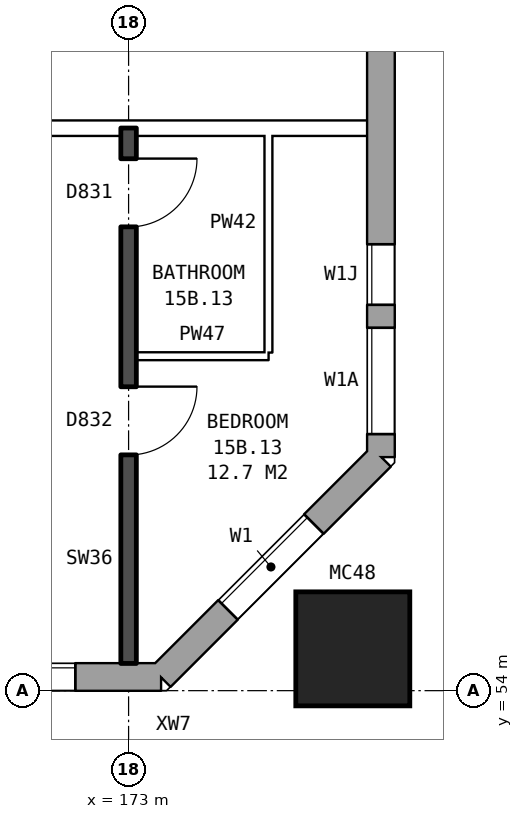
"""IFC4 building model, lengths in metres.
Left out: names, types, materials, properties, quantities, classifications, styles, units other than length and angle.
Written with IfcOpenShell. Run it as: python <this file> out.ifc"""

import sys

from ifc_helpers import new_model, si_unit, direction, frame, frame_2d, origin, origin_2d, place, context, subcontext, project, spatial, rectangle, hollow_rectangle, extrude, element, fill, save


model = new_model("IFC4")
c1 = context("Model", 3, precision=1e-05, world=origin(), true_north=direction((0.0, 1.0)))
c2 = subcontext(c1, "Body", "Model", "MODEL_VIEW")
j1 = project(units=[si_unit("LENGTHUNIT", "METRE"), si_unit("PLANEANGLEUNIT", "RADIAN")], contexts=[c1])
p1 = place(None, origin())
s1 = spatial("IfcSite", under=j1, at=p1, CompositionType="ELEMENT")
p2 = place(p1, origin())
s2 = spatial("IfcBuilding", under=s1, at=p2, CompositionType="ELEMENT")
p3 = place(p2, frame((0.0, 0.0, 56.7)))
s3 = spatial("IfcBuildingStorey", under=s2, at=p3, CompositionType="ELEMENT", Elevation=56.7)
p4 = place(p3, frame((175.95, 54.55, 0.0), z_axis=(0.0, 0.0, 1.0), x_axis=(1.0, 0.0, 0.0)))
e1 = element("IfcColumn", 1, at=p4, inside=s3, PredefinedType="COLUMN", context=c2, shape_type="SweptSolid", body=[
    extrude(hollow_rectangle(XDim=1.5, YDim=1.5, WallThickness=0.08, at=origin_2d()), origin(), (0.0, 0.0, 1.0), 3.1),
])
p5 = place(p3, frame((134.075, 54.18, 0.0), z_axis=(0.0, 0.0, 1.0), x_axis=(1.0, 0.0, 0.0)))
e2 = element("IfcWall", 2, at=p5, inside=s3, PredefinedType="STANDARD", context=c2, shape_type="SweptSolid", body=[
    extrude(rectangle(XDim=39.351, YDim=0.36, at=frame_2d((19.675, 0.0))), origin(), (0.0, 0.0, 1.0), 2.85),
])
p6 = place(p5, frame((0.625, 0.0, 0.8)))
e3 = element("IfcOpeningElement", 3, at=p6, cuts=e2, PredefinedType="OPENING", context=c2, shape_type="SweptSolid", body=[
    extrude(rectangle(XDim=1.6, YDim=1.8, at=frame_2d((0.8, 0.9))), frame((0.0, 0.19, 0.0), z_axis=(0.0, -1.0, 0.0), x_axis=(1.0, 0.0, 0.0)), (0.0, 0.0, 1.0), 0.38),
])
p7 = place(p5, frame((3.625, 0.0, 0.8)))
e4 = element("IfcOpeningElement", 4, at=p7, cuts=e2, PredefinedType="OPENING", context=c2, shape_type="SweptSolid", body=[
    extrude(rectangle(XDim=1.6, YDim=1.8, at=frame_2d((0.8, 0.9))), frame((0.0, 0.19, 0.0), z_axis=(0.0, -1.0, 0.0), x_axis=(1.0, 0.0, 0.0)), (0.0, 0.0, 1.0), 0.38),
])
p8 = place(p5, frame((6.625, 0.0, 0.8)))
e5 = element("IfcOpeningElement", 5, at=p8, cuts=e2, PredefinedType="OPENING", context=c2, shape_type="SweptSolid", body=[
    extrude(rectangle(XDim=1.6, YDim=1.8, at=frame_2d((0.8, 0.9))), frame((0.0, 0.19, 0.0), z_axis=(0.0, -1.0, 0.0), x_axis=(1.0, 0.0, 0.0)), (0.0, 0.0, 1.0), 0.38),
])
p9 = place(p5, frame((9.625, 0.0, 0.8)))
e6 = element("IfcOpeningElement", 6, at=p9, cuts=e2, PredefinedType="OPENING", context=c2, shape_type="SweptSolid", body=[
    extrude(rectangle(XDim=1.6, YDim=1.8, at=frame_2d((0.8, 0.9))), frame((0.0, 0.19, 0.0), z_axis=(0.0, -1.0, 0.0), x_axis=(1.0, 0.0, 0.0)), (0.0, 0.0, 1.0), 0.38),
])
p10 = place(p5, frame((12.075, 0.0, 0.8)))
e7 = element("IfcOpeningElement", 7, at=p10, cuts=e2, PredefinedType="OPENING", context=c2, shape_type="SweptSolid", body=[
    extrude(rectangle(XDim=0.8, YDim=1.8, at=frame_2d((0.4, 0.9))), frame((0.0, 0.19, 0.0), z_axis=(0.0, -1.0, 0.0), x_axis=(1.0, 0.0, 0.0)), (0.0, 0.0, 1.0), 0.38),
])
p11 = place(p5, frame((15.275, 0.0, 0.8)))
e8 = element("IfcOpeningElement", 8, at=p11, cuts=e2, PredefinedType="OPENING", context=c2, shape_type="SweptSolid", body=[
    extrude(rectangle(XDim=0.8, YDim=0.9, at=frame_2d((0.4, 0.45))), frame((0.0, 0.19, 0.0), z_axis=(0.0, -1.0, 0.0), x_axis=(1.0, 0.0, 0.0)), (0.0, 0.0, 1.0), 0.38),
])
p12 = place(p5, frame((18.625, 0.0, 0.8)))
e9 = element("IfcOpeningElement", 9, at=p12, cuts=e2, PredefinedType="OPENING", context=c2, shape_type="SweptSolid", body=[
    extrude(rectangle(XDim=1.6, YDim=1.8, at=frame_2d((0.8, 0.9))), frame((0.0, 0.19, 0.0), z_axis=(0.0, -1.0, 0.0), x_axis=(1.0, 0.0, 0.0)), (0.0, 0.0, 1.0), 0.38),
])
p13 = place(p5, frame((21.625, 0.0, 0.8)))
e10 = element("IfcOpeningElement", 10, at=p13, cuts=e2, PredefinedType="OPENING", context=c2, shape_type="SweptSolid", body=[
    extrude(rectangle(XDim=1.6, YDim=1.8, at=frame_2d((0.8, 0.9))), frame((0.0, 0.19, 0.0), z_axis=(0.0, -1.0, 0.0), x_axis=(1.0, 0.0, 0.0)), (0.0, 0.0, 1.0), 0.38),
])
p14 = place(p5, frame((25.275, 0.0, 1.7)))
e11 = element("IfcOpeningElement", 11, at=p14, cuts=e2, PredefinedType="OPENING", context=c2, shape_type="SweptSolid", body=[
    extrude(rectangle(XDim=1.4, YDim=0.9, at=frame_2d((0.7, 0.45))), frame((0.0, 0.19, 0.0), z_axis=(0.0, -1.0, 0.0), x_axis=(1.0, 0.0, 0.0)), (0.0, 0.0, 1.0), 0.38),
])
p15 = place(p5, frame((27.625, 0.0, 0.8)))
e12 = element("IfcOpeningElement", 12, at=p15, cuts=e2, PredefinedType="OPENING", context=c2, shape_type="SweptSolid", body=[
    extrude(rectangle(XDim=1.6, YDim=1.8, at=frame_2d((0.8, 0.9))), frame((0.0, 0.19, 0.0), z_axis=(0.0, -1.0, 0.0), x_axis=(1.0, 0.0, 0.0)), (0.0, 0.0, 1.0), 0.38),
])
p16 = place(p5, frame((30.625, 0.0, 0.8)))
e13 = element("IfcOpeningElement", 13, at=p16, cuts=e2, PredefinedType="OPENING", context=c2, shape_type="SweptSolid", body=[
    extrude(rectangle(XDim=1.6, YDim=1.8, at=frame_2d((0.8, 0.9))), frame((0.0, 0.19, 0.0), z_axis=(0.0, -1.0, 0.0), x_axis=(1.0, 0.0, 0.0)), (0.0, 0.0, 1.0), 0.38),
])
p17 = place(p5, frame((33.625, 0.0, 0.8)))
e14 = element("IfcOpeningElement", 14, at=p17, cuts=e2, PredefinedType="OPENING", context=c2, shape_type="SweptSolid", body=[
    extrude(rectangle(XDim=1.6, YDim=1.8, at=frame_2d((0.8, 0.9))), frame((0.0, 0.19, 0.0), z_axis=(0.0, -1.0, 0.0), x_axis=(1.0, 0.0, 0.0)), (0.0, 0.0, 1.0), 0.38),
])
p18 = place(p5, frame((36.625, 0.0, 0.8)))
e15 = element("IfcOpeningElement", 15, at=p18, cuts=e2, PredefinedType="OPENING", context=c2, shape_type="SweptSolid", body=[
    extrude(rectangle(XDim=1.6, YDim=1.8, at=frame_2d((0.8, 0.9))), frame((0.0, 0.19, 0.0), z_axis=(0.0, -1.0, 0.0), x_axis=(1.0, 0.0, 0.0)), (0.0, 0.0, 1.0), 0.38),
])
p19 = place(p5, frame((13.175, 0.0, 1.7)))
e16 = element("IfcOpeningElement", 16, at=p19, cuts=e2, PredefinedType="OPENING", context=c2, shape_type="SweptSolid", body=[
    extrude(rectangle(XDim=0.8, YDim=0.9, at=frame_2d((0.4, 0.45))), frame((0.0, 0.19, 0.0), z_axis=(0.0, -1.0, 0.0), x_axis=(1.0, 0.0, 0.0)), (0.0, 0.0, 1.0), 0.38),
])
p20 = place(p5, frame((16.375, 0.0, 0.8)))
e17 = element("IfcOpeningElement", 17, at=p20, cuts=e2, PredefinedType="OPENING", context=c2, shape_type="SweptSolid", body=[
    extrude(rectangle(XDim=1.4, YDim=1.8, at=frame_2d((0.7, 0.9))), frame((0.0, 0.19, 0.0), z_axis=(0.0, -1.0, 0.0), x_axis=(1.0, 0.0, 0.0)), (0.0, 0.0, 1.0), 0.38),
])
p21 = place(p3, frame((173.425, 54.18, 0.0), z_axis=(0.0, 0.0, 1.0), x_axis=(0.707106781187, 0.707106781187, 0.0)))
e18 = element("IfcWall", 18, at=p21, inside=s3, PredefinedType="STANDARD", context=c2, shape_type="SweptSolid", body=[
    extrude(rectangle(XDim=4.094, YDim=0.36, at=frame_2d((2.047, 0.0))), origin(), (0.0, 0.0, 1.0), 2.85),
])
p22 = place(p21, frame((1.247, 0.0, 0.8)))
e19 = element("IfcOpeningElement", 19, at=p22, cuts=e18, PredefinedType="OPENING", context=c2, shape_type="SweptSolid", body=[
    extrude(rectangle(XDim=1.6, YDim=1.8, at=frame_2d((0.8, 0.9))), frame((0.0, 0.19, 0.0), z_axis=(0.0, -1.0, 0.0), x_axis=(1.0, 0.0, 0.0)), (0.0, 0.0, 1.0), 0.38),
])
p23 = place(p3, frame((176.32, 57.075, 0.0), z_axis=(0.0, 0.0, 1.0), x_axis=(0.0, 1.0, 0.0)))
e20 = element("IfcWall", 20, at=p23, inside=s3, PredefinedType="STANDARD", context=c2, shape_type="SweptSolid", body=[
    extrude(rectangle(XDim=25.851, YDim=0.36, at=frame_2d((12.925, 0.0))), origin(), (0.0, 0.0, 1.0), 2.85),
])
p24 = place(p23, frame((0.3, 0.0, 0.8)))
e21 = element("IfcOpeningElement", 21, at=p24, cuts=e20, PredefinedType="OPENING", context=c2, shape_type="SweptSolid", body=[
    extrude(rectangle(XDim=1.4, YDim=1.8, at=frame_2d((0.7, 0.9))), frame((0.0, 0.19, 0.0), z_axis=(0.0, -1.0, 0.0), x_axis=(1.0, 0.0, 0.0)), (0.0, 0.0, 1.0), 0.38),
])
p25 = place(p23, frame((5.525, 0.0, 1.4)))
e22 = element("IfcOpeningElement", 22, at=p25, cuts=e20, PredefinedType="OPENING", context=c2, shape_type="SweptSolid", body=[
    extrude(rectangle(XDim=1.6, YDim=1.2, at=frame_2d((0.8, 0.6))), frame((0.0, 0.19, 0.0), z_axis=(0.0, -1.0, 0.0), x_axis=(1.0, 0.0, 0.0)), (0.0, 0.0, 1.0), 0.38),
])
p26 = place(p23, frame((7.625, 0.0, 0.8)))
e23 = element("IfcOpeningElement", 23, at=p26, cuts=e20, PredefinedType="OPENING", context=c2, shape_type="SweptSolid", body=[
    extrude(rectangle(XDim=1.6, YDim=1.8, at=frame_2d((0.8, 0.9))), frame((0.0, 0.19, 0.0), z_axis=(0.0, -1.0, 0.0), x_axis=(1.0, 0.0, 0.0)), (0.0, 0.0, 1.0), 0.38),
])
p27 = place(p23, frame((10.625, 0.0, 0.8)))
e24 = element("IfcOpeningElement", 24, at=p27, cuts=e20, PredefinedType="OPENING", context=c2, shape_type="SweptSolid", body=[
    extrude(rectangle(XDim=1.6, YDim=1.8, at=frame_2d((0.8, 0.9))), frame((0.0, 0.19, 0.0), z_axis=(0.0, -1.0, 0.0), x_axis=(1.0, 0.0, 0.0)), (0.0, 0.0, 1.0), 0.38),
])
p28 = place(p23, frame((13.625, 0.0, 0.8)))
e25 = element("IfcOpeningElement", 25, at=p28, cuts=e20, PredefinedType="OPENING", context=c2, shape_type="SweptSolid", body=[
    extrude(rectangle(XDim=1.6, YDim=1.8, at=frame_2d((0.8, 0.9))), frame((0.0, 0.19, 0.0), z_axis=(0.0, -1.0, 0.0), x_axis=(1.0, 0.0, 0.0)), (0.0, 0.0, 1.0), 0.38),
])
p29 = place(p23, frame((16.625, 0.0, 0.8)))
e26 = element("IfcOpeningElement", 26, at=p29, cuts=e20, PredefinedType="OPENING", context=c2, shape_type="SweptSolid", body=[
    extrude(rectangle(XDim=1.6, YDim=1.8, at=frame_2d((0.8, 0.9))), frame((0.0, 0.19, 0.0), z_axis=(0.0, -1.0, 0.0), x_axis=(1.0, 0.0, 0.0)), (0.0, 0.0, 1.0), 0.38),
])
p30 = place(p23, frame((9.525, 0.0, 0.8)))
e27 = element("IfcOpeningElement", 27, at=p30, cuts=e20, PredefinedType="OPENING", context=c2, shape_type="SweptSolid", body=[
    extrude(rectangle(XDim=0.8, YDim=1.8, at=frame_2d((0.4, 0.9))), frame((0.0, 0.19, 0.0), z_axis=(0.0, -1.0, 0.0), x_axis=(1.0, 0.0, 0.0)), (0.0, 0.0, 1.0), 0.38),
])
p31 = place(p23, frame((22.525, 0.0, 0.8)))
e28 = element("IfcOpeningElement", 28, at=p31, cuts=e20, PredefinedType="OPENING", context=c2, shape_type="SweptSolid", body=[
    extrude(rectangle(XDim=1.0, YDim=1.2, at=frame_2d((0.5, 0.6))), frame((0.0, 0.19, 0.0), z_axis=(0.0, -1.0, 0.0), x_axis=(1.0, 0.0, 0.0)), (0.0, 0.0, 1.0), 0.38),
])
p32 = place(p23, frame((2.0, 0.0, 0.8)))
e29 = element("IfcOpeningElement", 29, at=p32, cuts=e20, PredefinedType="OPENING", context=c2, shape_type="SweptSolid", body=[
    extrude(rectangle(XDim=0.8, YDim=1.5, at=frame_2d((0.4, 0.75))), frame((0.0, 0.19, 0.0), z_axis=(0.0, -1.0, 0.0), x_axis=(1.0, 0.0, 0.0)), (0.0, 0.0, 1.0), 0.38),
])
p33 = place(p23, frame((12.525, 0.0, 0.8)))
e30 = element("IfcOpeningElement", 30, at=p33, cuts=e20, PredefinedType="OPENING", context=c2, shape_type="SweptSolid", body=[
    extrude(rectangle(XDim=0.8, YDim=1.8, at=frame_2d((0.4, 0.9))), frame((0.0, 0.19, 0.0), z_axis=(0.0, -1.0, 0.0), x_axis=(1.0, 0.0, 0.0)), (0.0, 0.0, 1.0), 0.38),
])
p34 = place(p23, frame((15.525, 0.0, 0.8)))
e31 = element("IfcOpeningElement", 31, at=p34, cuts=e20, PredefinedType="OPENING", context=c2, shape_type="SweptSolid", body=[
    extrude(rectangle(XDim=0.8, YDim=1.8, at=frame_2d((0.4, 0.9))), frame((0.0, 0.19, 0.0), z_axis=(0.0, -1.0, 0.0), x_axis=(1.0, 0.0, 0.0)), (0.0, 0.0, 1.0), 0.38),
])
p35 = place(p23, frame((18.525, 0.0, 0.9)))
e32 = element("IfcOpeningElement", 32, at=p35, cuts=e20, PredefinedType="OPENING", context=c2, shape_type="SweptSolid", body=[
    extrude(rectangle(XDim=0.8, YDim=1.5, at=frame_2d((0.4, 0.75))), frame((0.0, 0.19, 0.0), z_axis=(0.0, -1.0, 0.0), x_axis=(1.0, 0.0, 0.0)), (0.0, 0.0, 1.0), 0.38),
])
p36 = place(p23, frame((23.825, 0.0, 0.8)))
e33 = element("IfcOpeningElement", 33, at=p36, cuts=e20, PredefinedType="OPENING", context=c2, shape_type="SweptSolid", body=[
    extrude(rectangle(XDim=1.4, YDim=1.8, at=frame_2d((0.7, 0.9))), frame((0.0, 0.19, 0.0), z_axis=(0.0, -1.0, 0.0), x_axis=(1.0, 0.0, 0.0)), (0.0, 0.0, 1.0), 0.38),
])
p37 = place(p3, frame((173.1, 58.4, 0.0), z_axis=(0.0, 0.0, 1.0), x_axis=(1.0, 0.0, 0.0)))
e34 = element("IfcWall", 34, at=p37, inside=s3, PredefinedType="PARTITIONING", context=c2, shape_type="SweptSolid", body=[
    extrude(rectangle(XDim=1.74, YDim=0.1, at=frame_2d((0.87, 0.0))), origin(), (0.0, 0.0, 1.0), 2.85),
])
p38 = place(p3, frame((155.1, 61.4, 0.0), z_axis=(0.0, 0.0, 1.0), x_axis=(1.0, 0.0, 0.0)))
e35 = element("IfcWall", 35, at=p38, inside=s3, PredefinedType="PARTITIONING", context=c2, shape_type="SweptSolid", body=[
    extrude(rectangle(XDim=21.04, YDim=0.2, at=frame_2d((10.52, 0.0))), origin(), (0.0, 0.0, 1.0), 2.85),
])
p39 = place(p38, frame((1.45, 0.0, 0.0)))
e36 = element("IfcOpeningElement", 36, at=p39, cuts=e35, PredefinedType="OPENING", context=c2, shape_type="SweptSolid", body=[
    extrude(rectangle(XDim=1.0, YDim=2.1, at=frame_2d((0.5, 1.05))), frame((0.0, 0.11, 0.0), z_axis=(0.0, -1.0, 0.0), x_axis=(1.0, 0.0, 0.0)), (0.0, 0.0, 1.0), 0.22),
])
p40 = place(p38, frame((7.4, 0.0, 0.0)))
e37 = element("IfcOpeningElement", 37, at=p40, cuts=e35, PredefinedType="OPENING", context=c2, shape_type="SweptSolid", body=[
    extrude(rectangle(XDim=1.0, YDim=2.1, at=frame_2d((0.5, 1.05))), frame((0.0, 0.11, 0.0), z_axis=(0.0, -1.0, 0.0), x_axis=(1.0, 0.0, 0.0)), (0.0, 0.0, 1.0), 0.22),
])
p41 = place(p38, frame((14.4, 0.0, 0.0)))
e38 = element("IfcOpeningElement", 38, at=p41, cuts=e35, PredefinedType="OPENING", context=c2, shape_type="SweptSolid", body=[
    extrude(rectangle(XDim=1.0, YDim=2.1, at=frame_2d((0.5, 1.05))), frame((0.0, 0.11, 0.0), z_axis=(0.0, -1.0, 0.0), x_axis=(1.0, 0.0, 0.0)), (0.0, 0.0, 1.0), 0.22),
])
p42 = place(p3, frame((173.0, 54.36, 0.0), z_axis=(0.0, 0.0, 1.0), x_axis=(0.0, 1.0, 0.0)))
e39 = element("IfcWall", 39, at=p42, inside=s3, PredefinedType="SOLIDWALL", context=c2, shape_type="SweptSolid", body=[
    extrude(rectangle(XDim=7.04, YDim=0.2, at=frame_2d((3.52, 0.0))), origin(), (0.0, 0.0, 1.0), 2.85),
])
p43 = place(p42, frame((2.74, 0.0, 0.0)))
e40 = element("IfcOpeningElement", 40, at=p43, cuts=e39, PredefinedType="OPENING", context=c2, shape_type="SweptSolid", body=[
    extrude(rectangle(XDim=0.9, YDim=2.1, at=frame_2d((0.45, 1.05))), frame((0.0, 0.11, 0.0), z_axis=(0.0, -1.0, 0.0), x_axis=(1.0, 0.0, 0.0)), (0.0, 0.0, 1.0), 0.22),
])
p44 = place(p42, frame((5.74, 0.0, 0.0)))
e41 = element("IfcOpeningElement", 41, at=p44, cuts=e39, PredefinedType="OPENING", context=c2, shape_type="SweptSolid", body=[
    extrude(rectangle(XDim=0.9, YDim=2.1, at=frame_2d((0.45, 1.05))), frame((0.0, 0.11, 0.0), z_axis=(0.0, -1.0, 0.0), x_axis=(1.0, 0.0, 0.0)), (0.0, 0.0, 1.0), 0.22),
])
p45 = place(p3, frame((174.84, 58.45, 0.0), z_axis=(0.0, 0.0, 1.0), x_axis=(0.0, 1.0, 0.0)))
e42 = element("IfcWall", 42, at=p45, inside=s3, PredefinedType="PARTITIONING", context=c2, shape_type="SweptSolid", body=[
    extrude(rectangle(XDim=2.85, YDim=0.1, at=frame_2d((1.425, 0.0))), origin(), (0.0, 0.0, 1.0), 2.85),
])
p46 = place(p18, origin())
e43 = element("IfcWindow", 43, at=p46, inside=s3, PartitioningType="SINGLE_PANEL", PredefinedType="WINDOW", context=c2, shape_type="SweptSolid", body=[
    extrude(rectangle(XDim=1.6, YDim=1.8, at=frame_2d((0.8, 0.9))), frame((0.0, 0.15, 0.0), z_axis=(0.0, -1.0, 0.0), x_axis=(1.0, 0.0, 0.0)), (0.0, 0.0, 1.0), 0.06),
])
fill(e15, e43)
p47 = place(p22, origin())
e44 = element("IfcWindow", 44, at=p47, inside=s3, PartitioningType="SINGLE_PANEL", PredefinedType="WINDOW", context=c2, shape_type="SweptSolid", body=[
    extrude(rectangle(XDim=1.6, YDim=1.8, at=frame_2d((0.8, 0.9))), frame((0.0, 0.15, 0.0), z_axis=(0.0, -1.0, 0.0), x_axis=(1.0, 0.0, 0.0)), (0.0, 0.0, 1.0), 0.06),
])
fill(e19, e44)
p48 = place(p24, origin())
e45 = element("IfcWindow", 45, at=p48, inside=s3, PartitioningType="SINGLE_PANEL", PredefinedType="WINDOW", context=c2, shape_type="SweptSolid", body=[
    extrude(rectangle(XDim=1.4, YDim=1.8, at=frame_2d((0.7, 0.9))), frame((0.0, 0.15, 0.0), z_axis=(0.0, -1.0, 0.0), x_axis=(1.0, 0.0, 0.0)), (0.0, 0.0, 1.0), 0.06),
])
fill(e21, e45)
p49 = place(p43, frame((0.9, 0.0, 0.0), z_axis=(0.0, 0.0, 1.0), x_axis=(-1.0, 0.0, 0.0)))
e46 = element("IfcDoor", 46, at=p49, inside=s3, OperationType="SINGLE_SWING_LEFT", PredefinedType="DOOR", context=c2, shape_type="SweptSolid", body=[
    extrude(rectangle(XDim=0.9, YDim=2.1, at=frame_2d((0.45, 1.05))), frame((0.0, 0.025, 0.0), z_axis=(0.0, -1.0, 0.0), x_axis=(1.0, 0.0, 0.0)), (0.0, 0.0, 1.0), 0.05),
])
fill(e40, e46)
p50 = place(p44, frame((0.9, 0.0, 0.0), z_axis=(0.0, 0.0, 1.0), x_axis=(-1.0, 0.0, 0.0)))
e47 = element("IfcDoor", 47, at=p50, inside=s3, OperationType="SINGLE_SWING_LEFT", PredefinedType="DOOR", context=c2, shape_type="SweptSolid", body=[
    extrude(rectangle(XDim=0.9, YDim=2.1, at=frame_2d((0.45, 1.05))), frame((0.0, 0.025, 0.0), z_axis=(0.0, -1.0, 0.0), x_axis=(1.0, 0.0, 0.0)), (0.0, 0.0, 1.0), 0.05),
])
fill(e41, e47)
p51 = place(p32, origin())
e48 = element("IfcWindow", 48, at=p51, inside=s3, PartitioningType="SINGLE_PANEL", PredefinedType="WINDOW", context=c2, shape_type="SweptSolid", body=[
    extrude(rectangle(XDim=0.8, YDim=1.5, at=frame_2d((0.4, 0.75))), frame((0.0, 0.15, 0.0), z_axis=(0.0, -1.0, 0.0), x_axis=(1.0, 0.0, 0.0)), (0.0, 0.0, 1.0), 0.06),
])
fill(e29, e48)
save(model, sys.argv[1])
